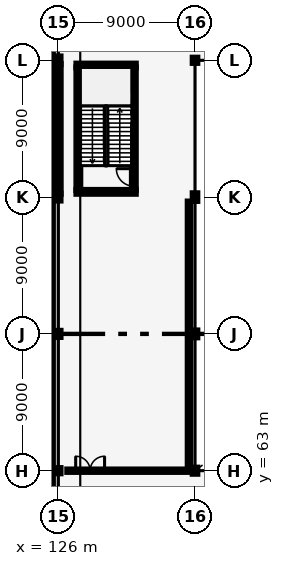
"""IFC4 building model, lengths in metres.
Left out: names, types, materials, properties, quantities, classifications, styles, units other than length and angle.
Written with IfcOpenShell. Run it as: python <this file> out.ifc"""

import sys

from ifc_helpers import new_model, si_unit, direction, frame, frame_2d, origin, origin_2d, place, context, subcontext, project, spatial, rectangle, i_section, extrude, element, fill, save


model = new_model("IFC4")
c1 = context("Model", 3, precision=1e-05, world=origin(), true_north=direction((0.0, 1.0)))
c2 = subcontext(c1, "Body", "Model", "MODEL_VIEW")
j1 = project(units=[si_unit("LENGTHUNIT", "METRE"), si_unit("PLANEANGLEUNIT", "RADIAN")], contexts=[c1])
p1 = place(None, origin())
s1 = spatial("IfcSite", under=j1, at=p1, CompositionType="ELEMENT")
p2 = place(p1, origin())
s2 = spatial("IfcBuilding", under=s1, at=p2, CompositionType="ELEMENT")
p3 = place(p2, frame((0.0, 0.0, 18.0)))
s3 = spatial("IfcBuildingStorey", under=s2, at=p3, CompositionType="ELEMENT", Elevation=18.0)
p4 = place(p3, frame((126.0, 63.0, 0.0), z_axis=(0.0, 0.0, 1.0), x_axis=(1.0, 0.0, 0.0)))
e1 = element("IfcColumn", 1, at=p4, inside=s3, PredefinedType="COLUMN", context=c2, shape_type="SweptSolid", body=[
    extrude(i_section(OverallWidth=0.3, OverallDepth=0.34, WebThickness=0.012, FlangeThickness=0.021, FilletRadius=0.027, at=origin_2d()), origin(), (0.0, 0.0, 1.0), 4.8),
])
p5 = place(p3, frame((126.0, 72.0, 0.0), z_axis=(0.0, 0.0, 1.0), x_axis=(1.0, 0.0, 0.0)))
e2 = element("IfcColumn", 2, at=p5, inside=s3, PredefinedType="COLUMN", context=c2, shape_type="SweptSolid", body=[
    extrude(i_section(OverallWidth=0.3, OverallDepth=0.4, WebThickness=0.013, FlangeThickness=0.024, FilletRadius=0.027, at=origin_2d()), origin(), (0.0, 0.0, 1.0), 4.8),
])
p6 = place(p3, frame((126.0, 81.0, 0.0), z_axis=(0.0, 0.0, 1.0), x_axis=(1.0, 0.0, 0.0)))
e3 = element("IfcColumn", 3, at=p6, inside=s3, PredefinedType="COLUMN", context=c2, shape_type="SweptSolid", body=[
    extrude(i_section(OverallWidth=0.3, OverallDepth=0.45, WebThickness=0.014, FlangeThickness=0.026, FilletRadius=0.027, at=origin_2d()), origin(), (0.0, 0.0, 1.0), 4.8),
])
p7 = place(p3, frame((126.0, 90.0, 0.0), z_axis=(0.0, 0.0, 1.0), x_axis=(1.0, 0.0, 0.0)))
e4 = element("IfcColumn", 4, at=p7, inside=s3, PredefinedType="COLUMN", context=c2, shape_type="SweptSolid", body=[
    extrude(i_section(OverallWidth=0.3, OverallDepth=0.5, WebThickness=0.014, FlangeThickness=0.028, FilletRadius=0.027, at=origin_2d()), origin(), (0.0, 0.0, 1.0), 4.8),
])
p8 = place(p3, frame((135.0, 63.0, 0.0), z_axis=(0.0, 0.0, 1.0), x_axis=(1.0, 0.0, 0.0)))
e5 = element("IfcColumn", 5, at=p8, inside=s3, PredefinedType="COLUMN", context=c2, shape_type="SweptSolid", body=[
    extrude(i_section(OverallWidth=0.3, OverallDepth=0.4, WebThickness=0.013, FlangeThickness=0.024, FilletRadius=0.027, at=origin_2d()), origin(), (0.0, 0.0, 1.0), 4.8),
])
p9 = place(p3, frame((135.0, 72.0, 0.0), z_axis=(0.0, 0.0, 1.0), x_axis=(1.0, 0.0, 0.0)))
e6 = element("IfcColumn", 6, at=p9, inside=s3, PredefinedType="COLUMN", context=c2, shape_type="SweptSolid", body=[
    extrude(i_section(OverallWidth=0.3, OverallDepth=0.45, WebThickness=0.014, FlangeThickness=0.026, FilletRadius=0.027, at=origin_2d()), origin(), (0.0, 0.0, 1.0), 4.8),
])
p10 = place(p3, frame((135.0, 81.0, 0.0), z_axis=(0.0, 0.0, 1.0), x_axis=(1.0, 0.0, 0.0)))
e7 = element("IfcColumn", 7, at=p10, inside=s3, PredefinedType="COLUMN", context=c2, shape_type="SweptSolid", body=[
    extrude(i_section(OverallWidth=0.3, OverallDepth=0.5, WebThickness=0.014, FlangeThickness=0.028, FilletRadius=0.027, at=origin_2d()), origin(), (0.0, 0.0, 1.0), 4.8),
])
p11 = place(p3, frame((135.0, 90.0, 0.0), z_axis=(0.0, 0.0, 1.0), x_axis=(1.0, 0.0, 0.0)))
e8 = element("IfcColumn", 8, at=p11, inside=s3, PredefinedType="COLUMN", context=c2, shape_type="SweptSolid", body=[
    extrude(i_section(OverallWidth=0.3, OverallDepth=0.34, WebThickness=0.012, FlangeThickness=0.021, FilletRadius=0.027, at=origin_2d()), origin(), (0.0, 0.0, 1.0), 4.8),
])
p12 = place(p3, frame((126.0, 81.22, 0.0), z_axis=(0.0, 0.0, 1.0), x_axis=(0.0, 1.0, 0.0)))
e9 = element("IfcWall", 9, at=p12, inside=s3, PredefinedType="SOLIDWALL", context=c2, shape_type="SweptSolid", body=[
    extrude(rectangle(XDim=8.535, YDim=0.32, at=frame_2d((4.268, 0.0))), origin(), (0.0, 0.0, 1.0), 3.65),
])
p13 = place(p3, frame((125.55, 55.0, 0.09), z_axis=(0.0, 0.0, 1.0), x_axis=(0.0, 1.0, 0.0)))
e10 = element("IfcWall", 10, at=p13, inside=s3, PredefinedType="PARAPET", context=c2, shape_type="SweptSolid", body=[
    extrude(rectangle(XDim=79.0, YDim=0.195, at=frame_2d((39.5, 0.0))), origin(), (0.0, 0.0, 1.0), 0.49),
])
p14 = place(p3, frame((127.325, 81.47, 0.0), z_axis=(0.0, 0.0, 1.0), x_axis=(0.0, 1.0, 0.0)))
e11 = element("IfcWall", 11, at=p14, inside=s3, PredefinedType="SHEAR", context=c2, shape_type="SweptSolid", body=[
    extrude(rectangle(XDim=8.06, YDim=0.25, at=frame_2d((4.03, 0.0))), origin(), (0.0, 0.0, 1.0), 4.44),
])
p15 = place(p3, frame((130.975, 81.47, 0.0), z_axis=(0.0, 0.0, 1.0), x_axis=(0.0, 1.0, 0.0)))
e12 = element("IfcWall", 12, at=p15, inside=s3, PredefinedType="SHEAR", context=c2, shape_type="SweptSolid", body=[
    extrude(rectangle(XDim=8.06, YDim=0.25, at=frame_2d((4.03, 0.0))), origin(), (0.0, 0.0, 1.0), 4.44),
])
p16 = place(p15, frame((0.25, 0.0, 0.0)))
e13 = element("IfcOpeningElement", 13, at=p16, cuts=e12, PredefinedType="OPENING", context=c2, shape_type="SweptSolid", body=[
    extrude(rectangle(XDim=1.15, YDim=2.15, at=frame_2d((0.575, 1.075))), frame((0.0, 0.135, 0.0), z_axis=(0.0, -1.0, 0.0), x_axis=(1.0, 0.0, 0.0)), (0.0, 0.0, 1.0), 0.27),
])
for number, where, z_axis, x_axis in (
    (14, (127.2, 81.345, 0.0), (0.0, 0.0, 1.0), (1.0, 0.0, 0.0)),
    (15, (127.2, 89.655, 0.0), (0.0, 0.0, 1.0), (1.0, 0.0, 0.0)),
):
    element("IfcWall", number, at=place(p3, frame(where, z_axis=z_axis, x_axis=x_axis)), inside=s3, PredefinedType="SHEAR", context=c2, shape_type="SweptSolid", body=[
        extrude(rectangle(XDim=3.9, YDim=0.25, at=frame_2d((1.95, 0.0))), origin(), (0.0, 0.0, 1.0), 4.44),
    ])
p17 = place(p3, frame((126.6, 63.0, 0.0), z_axis=(0.0, 0.0, 1.0), x_axis=(1.0, 0.0, 0.0)))
e16 = element("IfcWall", 16, at=p17, inside=s3, PredefinedType="PARTITIONING", context=c2, shape_type="SweptSolid", body=[
    extrude(rectangle(XDim=8.0, YDim=0.155, at=frame_2d((4.0, 0.0))), origin(), (0.0, 0.0, 1.0), 3.6),
])
p18 = place(p17, frame((0.55, 0.0, 0.0)))
e17 = element("IfcOpeningElement", 17, at=p18, cuts=e16, PredefinedType="OPENING", context=c2, shape_type="SweptSolid", body=[
    extrude(rectangle(XDim=1.9, YDim=2.4, at=frame_2d((0.95, 1.2))), frame((0.0, 0.087, 0.0), z_axis=(0.0, -1.0, 0.0), x_axis=(1.0, 0.0, 0.0)), (0.0, 0.0, 1.0), 0.175),
])
p19 = place(p3, frame((134.6, 63.093, 0.0), z_axis=(0.0, 0.0, 1.0), x_axis=(0.0, 1.0, 0.0)))
e18 = element("IfcWall", 18, at=p19, inside=s3, PredefinedType="PARTITIONING", context=c2, shape_type="SweptSolid", body=[
    extrude(rectangle(XDim=17.614, YDim=0.155, at=frame_2d((8.807, 0.0))), origin(), (0.0, 0.0, 1.0), 3.6),
])
p20 = place(p16, origin())
e19 = element("IfcDoor", 19, at=p20, inside=s3, OperationType="SINGLE_SWING_RIGHT", PredefinedType="DOOR", context=c2, shape_type="SweptSolid", body=[
    extrude(rectangle(XDim=1.15, YDim=2.15, at=frame_2d((0.575, 1.075))), frame((0.0, 0.025, 0.0), z_axis=(0.0, -1.0, 0.0), x_axis=(1.0, 0.0, 0.0)), (0.0, 0.0, 1.0), 0.05),
])
fill(e13, e19)
p21 = place(p18, origin())
e20 = element("IfcDoor", 20, at=p21, inside=s3, OperationType="DOUBLE_DOOR_SINGLE_SWING", PredefinedType="DOOR", context=c2, shape_type="SweptSolid", body=[
    extrude(rectangle(XDim=1.9, YDim=2.4, at=frame_2d((0.95, 1.2))), frame((0.0, 0.025, 0.0), z_axis=(0.0, -1.0, 0.0), x_axis=(1.0, 0.0, 0.0)), (0.0, 0.0, 1.0), 0.05),
])
fill(e17, e20)
save(model, sys.argv[1])
